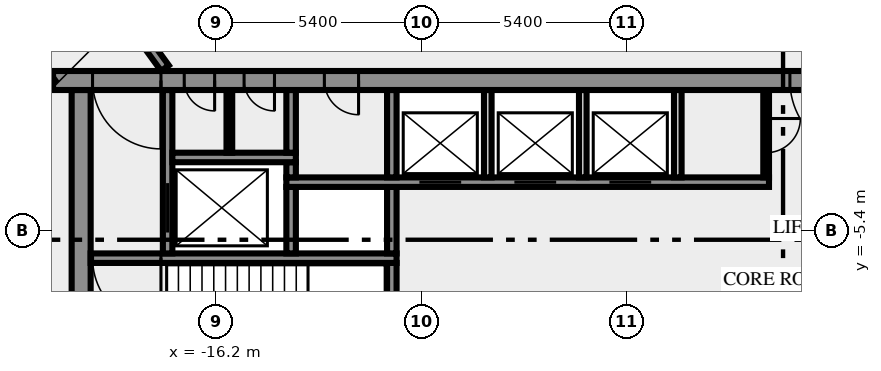
"""IFC4 building model, lengths in metres.
Left out: names, types, materials, properties, quantities, classifications, styles, units other than length and angle.
Written with IfcOpenShell. Run it as: python <this file> out.ifc"""

import sys

from ifc_helpers import new_model, si_unit, direction, frame, frame_2d, origin, place, context, subcontext, project, spatial, rectangle, extrude, element, fill, save


model = new_model("IFC4")
c1 = context("Model", 3, precision=1e-05, world=origin(), true_north=direction((0.0, 1.0)))
c2 = subcontext(c1, "Body", "Model", "MODEL_VIEW")
j1 = project(units=[si_unit("LENGTHUNIT", "METRE"), si_unit("PLANEANGLEUNIT", "RADIAN")], contexts=[c1])
p1 = place(None, origin())
s1 = spatial("IfcSite", under=j1, at=p1, CompositionType="ELEMENT")
p2 = place(p1, origin())
s2 = spatial("IfcBuilding", under=s1, at=p2, CompositionType="ELEMENT")
p3 = place(p2, frame((0.0, 0.0, 105.0)))
s3 = spatial("IfcBuildingStorey", under=s2, at=p3, CompositionType="ELEMENT", Elevation=105.0)
p4 = place(p3, frame((-19.75, -10.5, 0.0), z_axis=(0.0, 0.0, 1.0), x_axis=(0.0, 1.0, 0.0)))
e1 = element("IfcWall", 1, at=p4, inside=s3, PredefinedType="SHEAR", context=c2, shape_type="SweptSolid", body=[
    extrude(rectangle(XDim=8.8, YDim=0.5, at=frame_2d((4.4, 0.0))), origin(), (0.0, 0.0, 1.0), 3.65),
])
p5 = place(p3, frame((-11.575, -7.25, 0.0), z_axis=(0.0, 0.0, 1.0), x_axis=(0.0, 1.0, 0.0)))
e2 = element("IfcWall", 2, at=p5, inside=s3, PredefinedType="SHEAR", context=c2, shape_type="SweptSolid", body=[
    extrude(rectangle(XDim=1.0, YDim=0.25, at=frame_2d((0.5, 0.0))), origin(), (0.0, 0.0, 1.0), 3.65),
])
p6 = place(p3, frame((-11.45, -6.125, 0.0), z_axis=(0.0, 0.0, 1.0), x_axis=(-1.0, 0.0, 0.0)))
e3 = element("IfcWall", 3, at=p6, inside=s3, PredefinedType="SHEAR", context=c2, shape_type="SweptSolid", body=[
    extrude(rectangle(XDim=8.05, YDim=0.25, at=frame_2d((4.025, 0.0))), origin(), (0.0, 0.0, 1.0), 3.65),
])
p7 = place(p6, frame((6.2, 0.0, 0.0)))
e4 = element("IfcOpeningElement", 4, at=p7, cuts=e3, PredefinedType="OPENING", context=c2, shape_type="SweptSolid", body=[
    extrude(rectangle(XDim=1.8, YDim=2.1, at=frame_2d((0.9, 1.05))), frame((0.0, 0.135, 0.0), z_axis=(0.0, -1.0, 0.0), x_axis=(1.0, 0.0, 0.0)), (0.0, 0.0, 1.0), 0.27),
])
p8 = place(p3, frame((-17.475, -6.0, 0.0), z_axis=(0.0, 0.0, 1.0), x_axis=(0.0, 1.0, 0.0)))
e5 = element("IfcWall", 5, at=p8, inside=s3, PredefinedType="SHEAR", context=c2, shape_type="SweptSolid", body=[
    extrude(rectangle(XDim=4.3, YDim=0.25, at=frame_2d((2.15, 0.0))), origin(), (0.0, 0.0, 1.0), 3.65),
])
p9 = place(p8, frame((0.55, 0.0, 0.0)))
e6 = element("IfcOpeningElement", 6, at=p9, cuts=e5, PredefinedType="OPENING", context=c2, shape_type="SweptSolid", body=[
    extrude(rectangle(XDim=1.3, YDim=2.1, at=frame_2d((0.65, 1.05))), frame((0.0, 0.135, 0.0), z_axis=(0.0, -1.0, 0.0), x_axis=(1.0, 0.0, 0.0)), (0.0, 0.0, 1.0), 0.27),
])
for number, where, z_axis, x_axis in (
    (7, (-14.225, -6.0, 0.0), (0.0, 0.0, 1.0), (0.0, 1.0, 0.0)),
    (8, (-11.575, -6.0, 0.0), (0.0, 0.0, 1.0), (0.0, 1.0, 0.0)),
):
    element("IfcWall", number, at=place(p3, frame(where, z_axis=z_axis, x_axis=x_axis)), inside=s3, PredefinedType="SHEAR", context=c2, shape_type="SweptSolid", body=[
        extrude(rectangle(XDim=1.75, YDim=0.25, at=frame_2d((0.875, 0.0))), origin(), (0.0, 0.0, 1.0), 3.65),
    ])
p10 = place(p3, frame((-14.35, -4.125, 0.0), z_axis=(0.0, 0.0, 1.0), x_axis=(1.0, 0.0, 0.0)))
e9 = element("IfcWall", 9, at=p10, inside=s3, PredefinedType="SHEAR", context=c2, shape_type="SweptSolid", body=[
    extrude(rectangle(XDim=12.7, YDim=0.25, at=frame_2d((6.35, 0.0))), origin(), (0.0, 0.0, 1.0), 3.65),
])
p11 = place(p10, frame((3.5, 0.0, 0.0)))
e10 = element("IfcOpeningElement", 10, at=p11, cuts=e9, PredefinedType="OPENING", context=c2, shape_type="SweptSolid", body=[
    extrude(rectangle(XDim=1.1, YDim=2.1, at=frame_2d((0.55, 1.05))), frame((0.0, 0.135, 0.0), z_axis=(0.0, -1.0, 0.0), x_axis=(1.0, 0.0, 0.0)), (0.0, 0.0, 1.0), 0.27),
])
p12 = place(p10, frame((6.0, 0.0, 0.0)))
e11 = element("IfcOpeningElement", 11, at=p12, cuts=e9, PredefinedType="OPENING", context=c2, shape_type="SweptSolid", body=[
    extrude(rectangle(XDim=1.1, YDim=2.1, at=frame_2d((0.55, 1.05))), frame((0.0, 0.135, 0.0), z_axis=(0.0, -1.0, 0.0), x_axis=(1.0, 0.0, 0.0)), (0.0, 0.0, 1.0), 0.27),
])
p13 = place(p10, frame((8.5, 0.0, 0.0)))
e12 = element("IfcOpeningElement", 12, at=p13, cuts=e9, PredefinedType="OPENING", context=c2, shape_type="SweptSolid", body=[
    extrude(rectangle(XDim=1.1, YDim=2.1, at=frame_2d((0.55, 1.05))), frame((0.0, 0.135, 0.0), z_axis=(0.0, -1.0, 0.0), x_axis=(1.0, 0.0, 0.0)), (0.0, 0.0, 1.0), 0.27),
])
p14 = place(p3, frame((-14.225, -4.0, 0.0), z_axis=(0.0, 0.0, 1.0), x_axis=(0.0, 1.0, 0.0)))
e13 = element("IfcWall", 13, at=p14, inside=s3, PredefinedType="SHEAR", context=c2, shape_type="SweptSolid", body=[
    extrude(rectangle(XDim=0.4, YDim=0.25, at=frame_2d((0.2, 0.0))), origin(), (0.0, 0.0, 1.0), 3.65),
])
p15 = place(p3, frame((-11.575, -4.0, 0.0), z_axis=(0.0, 0.0, 1.0), x_axis=(0.0, 1.0, 0.0)))
e14 = element("IfcWall", 14, at=p15, inside=s3, PredefinedType="SHEAR", context=c2, shape_type="SweptSolid", body=[
    extrude(rectangle(XDim=2.3, YDim=0.25, at=frame_2d((1.15, 0.0))), origin(), (0.0, 0.0, 1.0), 3.65),
])
for number, where, z_axis, x_axis in (
    (15, (-9.05, -4.0, 0.0), (0.0, 0.0, 1.0), (0.0, 1.0, 0.0)),
    (16, (-6.55, -4.0, 0.0), (0.0, 0.0, 1.0), (0.0, 1.0, 0.0)),
    (17, (-4.05, -4.0, 0.0), (0.0, 0.0, 1.0), (0.0, 1.0, 0.0)),
):
    element("IfcWall", number, at=place(p3, frame(where, z_axis=z_axis, x_axis=x_axis)), inside=s3, PredefinedType="SOLIDWALL", context=c2, shape_type="SweptSolid", body=[
        extrude(rectangle(XDim=2.3, YDim=0.2, at=frame_2d((1.15, 0.0))), origin(), (0.0, 0.0, 1.0), 3.65),
    ])
p16 = place(p3, frame((-1.725, -1.7, 0.0), z_axis=(0.0, 0.0, 1.0), x_axis=(0.0, -1.0, 0.0)))
e18 = element("IfcWall", 18, at=p16, inside=s3, PredefinedType="PARTITIONING", context=c2, shape_type="SweptSolid", body=[
    extrude(rectangle(XDim=2.3, YDim=0.15, at=frame_2d((1.15, 0.0))), origin(), (0.0, 0.0, 1.0), 3.65),
])
p17 = place(p16, frame((0.75, 0.0, 0.0)))
e19 = element("IfcOpeningElement", 19, at=p17, cuts=e18, PredefinedType="OPENING", context=c2, shape_type="SweptSolid", body=[
    extrude(rectangle(XDim=0.9, YDim=2.1, at=frame_2d((0.45, 1.05))), frame((0.0, 0.085, 0.0), z_axis=(0.0, -1.0, 0.0), x_axis=(1.0, 0.0, 0.0)), (0.0, 0.0, 1.0), 0.17),
])
p18 = place(p3, frame((-17.35, -3.475, 0.0), z_axis=(0.0, 0.0, 1.0), x_axis=(1.0, 0.0, 0.0)))
e20 = element("IfcWall", 20, at=p18, inside=s3, PredefinedType="SHEAR", context=c2, shape_type="SweptSolid", body=[
    extrude(rectangle(XDim=3.25, YDim=0.25, at=frame_2d((1.625, 0.0))), origin(), (0.0, 0.0, 1.0), 3.65),
])
p19 = place(p3, frame((-15.85, -3.35, 0.0), z_axis=(0.0, 0.0, 1.0), x_axis=(0.0, 1.0, 0.0)))
e21 = element("IfcWall", 21, at=p19, inside=s3, PredefinedType="PARTITIONING", context=c2, shape_type="SweptSolid", body=[
    extrude(rectangle(XDim=1.65, YDim=0.15, at=frame_2d((0.825, 0.0))), origin(), (0.0, 0.0, 1.0), 3.65),
])
p20 = place(p3, frame((-14.225, -3.35, 0.0), z_axis=(0.0, 0.0, 1.0), x_axis=(0.0, 1.0, 0.0)))
e22 = element("IfcWall", 22, at=p20, inside=s3, PredefinedType="SHEAR", context=c2, shape_type="SweptSolid", body=[
    extrude(rectangle(XDim=1.65, YDim=0.25, at=frame_2d((0.825, 0.0))), origin(), (0.0, 0.0, 1.0), 3.65),
])
p21 = place(p3, frame((20.49, -1.45, 0.0), z_axis=(0.0, 0.0, 1.0), x_axis=(-1.0, 0.0, 0.0)))
e23 = element("IfcWall", 23, at=p21, inside=s3, PredefinedType="SHEAR", context=c2, shape_type="SweptSolid", body=[
    extrude(rectangle(XDim=40.98, YDim=0.5, at=frame_2d((20.49, 0.0))), origin(), (0.0, 0.0, 1.0), 3.65),
])
p22 = place(p21, frame((38.14, 0.0, 0.0)))
e24 = element("IfcOpeningElement", 24, at=p22, cuts=e23, PredefinedType="OPENING", context=c2, shape_type="SweptSolid", body=[
    extrude(rectangle(XDim=1.8, YDim=2.1, at=frame_2d((0.9, 1.05))), frame((0.0, 0.26, 0.0), z_axis=(0.0, -1.0, 0.0), x_axis=(1.0, 0.0, 0.0)), (0.0, 0.0, 1.0), 0.52),
])
p23 = place(p21, frame((36.728, 0.0, 0.0)))
e25 = element("IfcOpeningElement", 25, at=p23, cuts=e23, PredefinedType="OPENING", context=c2, shape_type="SweptSolid", body=[
    extrude(rectangle(XDim=0.8, YDim=2.1, at=frame_2d((0.4, 1.05))), frame((0.0, 0.26, 0.0), z_axis=(0.0, -1.0, 0.0), x_axis=(1.0, 0.0, 0.0)), (0.0, 0.0, 1.0), 0.52),
])
p24 = place(p21, frame((35.153, 0.0, 0.0)))
e26 = element("IfcOpeningElement", 26, at=p24, cuts=e23, PredefinedType="OPENING", context=c2, shape_type="SweptSolid", body=[
    extrude(rectangle(XDim=0.8, YDim=2.1, at=frame_2d((0.4, 1.05))), frame((0.0, 0.26, 0.0), z_axis=(0.0, -1.0, 0.0), x_axis=(1.0, 0.0, 0.0)), (0.0, 0.0, 1.0), 0.52),
])
p25 = place(p21, frame((32.94, 0.0, 0.0)))
e27 = element("IfcOpeningElement", 27, at=p25, cuts=e23, PredefinedType="OPENING", context=c2, shape_type="SweptSolid", body=[
    extrude(rectangle(XDim=0.9, YDim=2.1, at=frame_2d((0.45, 1.05))), frame((0.0, 0.26, 0.0), z_axis=(0.0, -1.0, 0.0), x_axis=(1.0, 0.0, 0.0)), (0.0, 0.0, 1.0), 0.52),
])
p26 = place(p21, frame((19.59, 0.0, 0.0)))
e28 = element("IfcOpeningElement", 28, at=p26, cuts=e23, PredefinedType="OPENING", context=c2, shape_type="SweptSolid", body=[
    extrude(rectangle(XDim=2.0, YDim=2.1, at=frame_2d((1.0, 1.05))), frame((0.0, 0.26, 0.0), z_axis=(0.0, -1.0, 0.0), x_axis=(1.0, 0.0, 0.0)), (0.0, 0.0, 1.0), 0.52),
])
p27 = place(p21, frame((7.14, 0.0, 0.0)))
e29 = element("IfcOpeningElement", 29, at=p27, cuts=e23, PredefinedType="OPENING", context=c2, shape_type="SweptSolid", body=[
    extrude(rectangle(XDim=0.9, YDim=2.1, at=frame_2d((0.45, 1.05))), frame((0.0, 0.26, 0.0), z_axis=(0.0, -1.0, 0.0), x_axis=(1.0, 0.0, 0.0)), (0.0, 0.0, 1.0), 0.52),
])
p28 = place(p21, frame((4.19, 0.0, 0.0)))
e30 = element("IfcOpeningElement", 30, at=p28, cuts=e23, PredefinedType="OPENING", context=c2, shape_type="SweptSolid", body=[
    extrude(rectangle(XDim=0.9, YDim=2.1, at=frame_2d((0.45, 1.05))), frame((0.0, 0.26, 0.0), z_axis=(0.0, -1.0, 0.0), x_axis=(1.0, 0.0, 0.0)), (0.0, 0.0, 1.0), 0.52),
])
p29 = place(p21, frame((1.04, 0.0, 0.0)))
e31 = element("IfcOpeningElement", 31, at=p29, cuts=e23, PredefinedType="OPENING", context=c2, shape_type="SweptSolid", body=[
    extrude(rectangle(XDim=1.8, YDim=2.1, at=frame_2d((0.9, 1.05))), frame((0.0, 0.26, 0.0), z_axis=(0.0, -1.0, 0.0), x_axis=(1.0, 0.0, 0.0)), (0.0, 0.0, 1.0), 0.52),
])
p30 = place(p3, frame((-20.531, -1.523, 0.0), z_axis=(0.0, 0.0, 1.0), x_axis=(-0.587784593204, 0.809017473231, 0.0)))
e32 = element("IfcWall", 32, at=p30, inside=s3, PredefinedType="SOLIDWALL", context=c2, shape_type="SweptSolid", body=[
    extrude(rectangle(XDim=44.67, YDim=0.25, at=frame_2d((22.335, 0.0))), origin(), (0.0, 0.0, 1.0), 3.65),
])
p31 = place(p30, frame((43.296, 0.0, 0.0)))
e33 = element("IfcOpeningElement", 33, at=p31, cuts=e32, PredefinedType="OPENING", context=c2, shape_type="SweptSolid", body=[
    extrude(rectangle(XDim=0.9, YDim=2.1, at=frame_2d((0.45, 1.05))), frame((0.0, 0.135, 0.0), z_axis=(0.0, -1.0, 0.0), x_axis=(1.0, 0.0, 0.0)), (0.0, 0.0, 1.0), 0.27),
])
p32 = place(p30, frame((15.916, 0.0, 0.0)))
e34 = element("IfcOpeningElement", 34, at=p32, cuts=e32, PredefinedType="OPENING", context=c2, shape_type="SweptSolid", body=[
    extrude(rectangle(XDim=0.9, YDim=2.1, at=frame_2d((0.45, 1.05))), frame((0.0, 0.135, 0.0), z_axis=(0.0, -1.0, 0.0), x_axis=(1.0, 0.0, 0.0)), (0.0, 0.0, 1.0), 0.27),
])
p33 = place(p30, frame((33.116, 0.0, 0.0)))
e35 = element("IfcOpeningElement", 35, at=p33, cuts=e32, PredefinedType="OPENING", context=c2, shape_type="SweptSolid", body=[
    extrude(rectangle(XDim=1.0, YDim=2.1, at=frame_2d((0.5, 1.05))), frame((0.0, 0.135, 0.0), z_axis=(0.0, -1.0, 0.0), x_axis=(1.0, 0.0, 0.0)), (0.0, 0.0, 1.0), 0.27),
])
p34 = place(p30, frame((14.216, 0.0, 0.0)))
e36 = element("IfcOpeningElement", 36, at=p34, cuts=e32, PredefinedType="OPENING", context=c2, shape_type="SweptSolid", body=[
    extrude(rectangle(XDim=1.0, YDim=2.1, at=frame_2d((0.5, 1.05))), frame((0.0, 0.135, 0.0), z_axis=(0.0, -1.0, 0.0), x_axis=(1.0, 0.0, 0.0)), (0.0, 0.0, 1.0), 0.27),
])
p35 = place(p3, frame((-37.232, 25.972, 0.0), z_axis=(0.0, 0.0, 1.0), x_axis=(0.587786323093, -0.809016216391, 0.0)))
e37 = element("IfcWall", 37, at=p35, inside=s3, PredefinedType="SOLIDWALL", context=c2, shape_type="SweptSolid", body=[
    extrude(rectangle(XDim=33.493, YDim=0.25, at=frame_2d((16.747, 0.0))), origin(), (0.0, 0.0, 1.0), 3.65),
])
p36 = place(p35, frame((13.185, 0.0, 0.0)))
e38 = element("IfcOpeningElement", 38, at=p36, cuts=e37, PredefinedType="OPENING", context=c2, shape_type="SweptSolid", body=[
    extrude(rectangle(XDim=1.2, YDim=2.1, at=frame_2d((0.6, 1.05))), frame((0.0, 0.135, 0.0), z_axis=(0.0, -1.0, 0.0), x_axis=(1.0, 0.0, 0.0)), (0.0, 0.0, 1.0), 0.27),
])
p37 = place(p35, frame((29.152, 0.0, 0.0)))
e39 = element("IfcOpeningElement", 39, at=p37, cuts=e37, PredefinedType="OPENING", context=c2, shape_type="SweptSolid", body=[
    extrude(rectangle(XDim=0.9, YDim=2.1, at=frame_2d((0.45, 1.05))), frame((0.0, 0.135, 0.0), z_axis=(0.0, -1.0, 0.0), x_axis=(1.0, 0.0, 0.0)), (0.0, 0.0, 1.0), 0.27),
])
p38 = place(p7, origin())
e40 = element("IfcDoor", 40, at=p38, inside=s3, OperationType="DOUBLE_DOOR_SINGLE_SWING", PredefinedType="DOOR", context=c2, shape_type="SweptSolid", body=[
    extrude(rectangle(XDim=1.8, YDim=2.1, at=frame_2d((0.9, 1.05))), frame((0.0, 0.025, 0.0), z_axis=(0.0, -1.0, 0.0), x_axis=(1.0, 0.0, 0.0)), (0.0, 0.0, 1.0), 0.05),
])
fill(e4, e40)
p39 = place(p9, origin())
e41 = element("IfcDoor", 41, at=p39, inside=s3, OperationType="DOUBLE_DOOR_SLIDING", PredefinedType="DOOR", context=c2, shape_type="SweptSolid", body=[
    extrude(rectangle(XDim=1.3, YDim=2.1, at=frame_2d((0.65, 1.05))), frame((0.0, 0.025, 0.0), z_axis=(0.0, -1.0, 0.0), x_axis=(1.0, 0.0, 0.0)), (0.0, 0.0, 1.0), 0.05),
])
fill(e6, e41)
p40 = place(p11, origin())
e42 = element("IfcDoor", 42, at=p40, inside=s3, OperationType="DOUBLE_DOOR_SLIDING", PredefinedType="DOOR", context=c2, shape_type="SweptSolid", body=[
    extrude(rectangle(XDim=1.1, YDim=2.1, at=frame_2d((0.55, 1.05))), frame((0.0, 0.025, 0.0), z_axis=(0.0, -1.0, 0.0), x_axis=(1.0, 0.0, 0.0)), (0.0, 0.0, 1.0), 0.05),
])
fill(e10, e42)
p41 = place(p12, origin())
e43 = element("IfcDoor", 43, at=p41, inside=s3, OperationType="DOUBLE_DOOR_SLIDING", PredefinedType="DOOR", context=c2, shape_type="SweptSolid", body=[
    extrude(rectangle(XDim=1.1, YDim=2.1, at=frame_2d((0.55, 1.05))), frame((0.0, 0.025, 0.0), z_axis=(0.0, -1.0, 0.0), x_axis=(1.0, 0.0, 0.0)), (0.0, 0.0, 1.0), 0.05),
])
fill(e11, e43)
p42 = place(p13, origin())
e44 = element("IfcDoor", 44, at=p42, inside=s3, OperationType="DOUBLE_DOOR_SLIDING", PredefinedType="DOOR", context=c2, shape_type="SweptSolid", body=[
    extrude(rectangle(XDim=1.1, YDim=2.1, at=frame_2d((0.55, 1.05))), frame((0.0, 0.025, 0.0), z_axis=(0.0, -1.0, 0.0), x_axis=(1.0, 0.0, 0.0)), (0.0, 0.0, 1.0), 0.05),
])
fill(e12, e44)
p43 = place(p17, origin())
e45 = element("IfcDoor", 45, at=p43, inside=s3, OperationType="SINGLE_SWING_RIGHT", PredefinedType="DOOR", context=c2, shape_type="SweptSolid", body=[
    extrude(rectangle(XDim=0.9, YDim=2.1, at=frame_2d((0.45, 1.05))), frame((0.0, 0.025, 0.0), z_axis=(0.0, -1.0, 0.0), x_axis=(1.0, 0.0, 0.0)), (0.0, 0.0, 1.0), 0.05),
])
fill(e19, e45)
p44 = place(p22, origin())
e46 = element("IfcDoor", 46, at=p44, inside=s3, OperationType="DOUBLE_DOOR_SINGLE_SWING", PredefinedType="DOOR", context=c2, shape_type="SweptSolid", body=[
    extrude(rectangle(XDim=1.8, YDim=2.1, at=frame_2d((0.9, 1.05))), frame((0.0, 0.025, 0.0), z_axis=(0.0, -1.0, 0.0), x_axis=(1.0, 0.0, 0.0)), (0.0, 0.0, 1.0), 0.05),
])
fill(e24, e46)
p45 = place(p23, origin())
e47 = element("IfcDoor", 47, at=p45, inside=s3, OperationType="SINGLE_SWING_RIGHT", PredefinedType="DOOR", context=c2, shape_type="SweptSolid", body=[
    extrude(rectangle(XDim=0.8, YDim=2.1, at=frame_2d((0.4, 1.05))), frame((0.0, 0.025, 0.0), z_axis=(0.0, -1.0, 0.0), x_axis=(1.0, 0.0, 0.0)), (0.0, 0.0, 1.0), 0.05),
])
fill(e25, e47)
p46 = place(p24, origin())
e48 = element("IfcDoor", 48, at=p46, inside=s3, OperationType="SINGLE_SWING_RIGHT", PredefinedType="DOOR", context=c2, shape_type="SweptSolid", body=[
    extrude(rectangle(XDim=0.8, YDim=2.1, at=frame_2d((0.4, 1.05))), frame((0.0, 0.025, 0.0), z_axis=(0.0, -1.0, 0.0), x_axis=(1.0, 0.0, 0.0)), (0.0, 0.0, 1.0), 0.05),
])
fill(e26, e48)
p47 = place(p25, origin())
e49 = element("IfcDoor", 49, at=p47, inside=s3, OperationType="SINGLE_SWING_RIGHT", PredefinedType="DOOR", context=c2, shape_type="SweptSolid", body=[
    extrude(rectangle(XDim=0.9, YDim=2.1, at=frame_2d((0.45, 1.05))), frame((0.0, 0.025, 0.0), z_axis=(0.0, -1.0, 0.0), x_axis=(1.0, 0.0, 0.0)), (0.0, 0.0, 1.0), 0.05),
])
fill(e27, e49)
p48 = place(p26, origin())
e50 = element("IfcDoor", 50, at=p48, inside=s3, OperationType="DOUBLE_DOOR_SINGLE_SWING", PredefinedType="DOOR", context=c2, shape_type="SweptSolid", body=[
    extrude(rectangle(XDim=2.0, YDim=2.1, at=frame_2d((1.0, 1.05))), frame((0.0, 0.025, 0.0), z_axis=(0.0, -1.0, 0.0), x_axis=(1.0, 0.0, 0.0)), (0.0, 0.0, 1.0), 0.05),
])
fill(e28, e50)
save(model, sys.argv[1])
